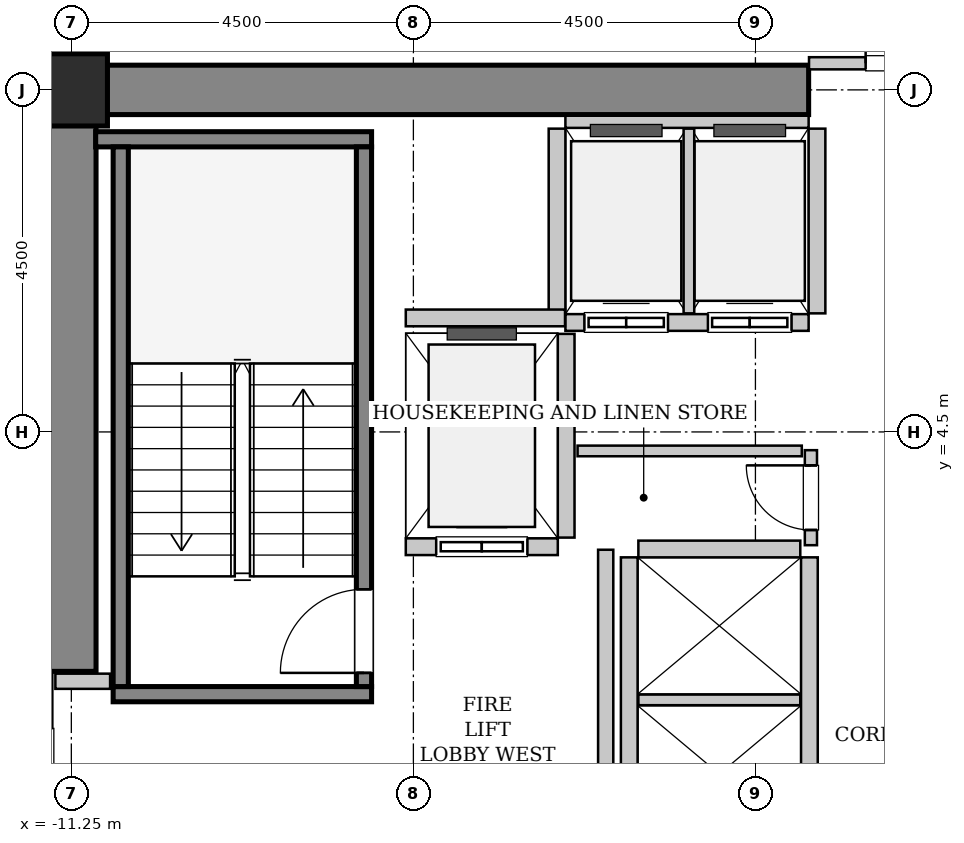
"""IFC4 building model, lengths in metres.
Left out: names, types, materials, properties, quantities, classifications, styles, units other than length and angle.
Written with IfcOpenShell. Run it as: python <this file> out.ifc"""

import sys

from ifc_helpers import new_model, si_unit, direction, frame, frame_2d, origin, origin_2d, place, context, subcontext, project, spatial, rectangle, hollow_rectangle, extrude, source, transform, mapped, element, fill, save


model = new_model("IFC4")
c1 = context("Model", 3, precision=1e-05, world=origin(), true_north=direction((0.0, 1.0)))
c2 = subcontext(c1, "Body", "Model", "MODEL_VIEW")
j1 = project(units=[si_unit("LENGTHUNIT", "METRE"), si_unit("PLANEANGLEUNIT", "RADIAN")], contexts=[c1])
p1 = place(None, origin())
s1 = spatial("IfcSite", under=j1, at=p1, CompositionType="ELEMENT")
p2 = place(p1, origin())
s2 = spatial("IfcBuilding", under=s1, at=p2, CompositionType="ELEMENT")
p3 = place(p2, frame((0.0, 0.0, 82.4)))
s3 = spatial("IfcBuildingStorey", under=s2, at=p3, CompositionType="ELEMENT", Elevation=82.4)
m1 = source(origin(), c2, "Body", "SweptSolid", [
    extrude(rectangle(XDim=10.025, YDim=0.65, at=frame_2d((5.012, 0.0))), origin(), (0.0, 0.0, 1.0), 3.8),
])
p4 = place(p3, frame((-11.575, 9.0, 0.0), z_axis=(0.0, 0.0, 1.0), x_axis=(1.0, 0.0, 0.0)))
e1 = element("IfcWall", 1, at=p4, inside=s3, PredefinedType="SHEAR", context=c2, shape_type="MappedRepresentation", body=[
    mapped(m1, transform((0.0, 0.0, 0.0), x_axis=(1.0, 0.0, 0.0), y_axis=(0.0, 1.0, 0.0), z_axis=(0.0, 0.0, 1.0), scale=1.0)),
])
m2 = source(origin(), c2, "Body", "SweptSolid", [
    extrude(rectangle(XDim=7.325, YDim=0.65, at=frame_2d((3.663, 0.0))), origin(), (0.0, 0.0, 1.0), 3.8),
])
p5 = place(p3, frame((-11.25, 1.35, 0.0), z_axis=(0.0, 0.0, 1.0), x_axis=(0.0, 1.0, 0.0)))
e2 = element("IfcWall", 2, at=p5, inside=s3, PredefinedType="SHEAR", context=c2, shape_type="MappedRepresentation", body=[
    mapped(m2, transform((0.0, 0.0, 0.0), x_axis=(1.0, 0.0, 0.0), y_axis=(0.0, 1.0, 0.0), z_axis=(0.0, 0.0, 1.0), scale=1.0)),
])
m3 = source(origin(), c2, "Body", "SweptSolid", [
    extrude(hollow_rectangle(XDim=0.95, YDim=0.95, WallThickness=0.045, InnerFilletRadius=0.045, OuterFilletRadius=0.09, at=origin_2d()), origin(), (0.0, 0.0, 1.0), 3.8),
])
p6 = place(p3, frame((-11.25, 9.0, 0.0), z_axis=(0.0, 0.0, 1.0), x_axis=(1.0, 0.0, 0.0)))
e3 = element("IfcColumn", 3, at=p6, inside=s3, PredefinedType="COLUMN", context=c2, shape_type="MappedRepresentation", body=[
    mapped(m3, transform((0.0, 0.0, 0.0), x_axis=(1.0, 0.0, 0.0), y_axis=(0.0, 1.0, 0.0), z_axis=(0.0, 0.0, 1.0), scale=1.0)),
])
m4 = source(origin(), c2, "Body", "SweptSolid", [
    extrude(rectangle(XDim=3.4, YDim=0.2, at=frame_2d((1.7, 0.0))), origin(), (0.0, 0.0, 1.0), 3.8),
])
p7 = place(p3, frame((-7.3, 1.05, 0.0), z_axis=(0.0, 0.0, 1.0), x_axis=(-1.0, 0.0, 0.0)))
e4 = element("IfcWall", 4, at=p7, inside=s3, PredefinedType="SOLIDWALL", context=c2, shape_type="MappedRepresentation", body=[
    mapped(m4, transform((0.0, 0.0, 0.0), x_axis=(1.0, 0.0, 0.0), y_axis=(0.0, 1.0, 0.0), z_axis=(0.0, 0.0, 1.0), scale=1.0)),
])
m5 = source(origin(), c2, "Body", "SweptSolid", [
    extrude(rectangle(XDim=3.63, YDim=0.2, at=frame_2d((1.815, 0.0))), origin(), (0.0, 0.0, 1.0), 3.8),
])
p8 = place(p3, frame((-7.3, 8.35, 0.0), z_axis=(0.0, 0.0, 1.0), x_axis=(-1.0, 0.0, 0.0)))
e5 = element("IfcWall", 5, at=p8, inside=s3, PredefinedType="SOLIDWALL", context=c2, shape_type="MappedRepresentation", body=[
    mapped(m5, transform((0.0, 0.0, 0.0), x_axis=(1.0, 0.0, 0.0), y_axis=(0.0, 1.0, 0.0), z_axis=(0.0, 0.0, 1.0), scale=1.0)),
])
m6 = source(origin(), c2, "Body", "SweptSolid", [
    extrude(rectangle(XDim=7.1, YDim=0.2, at=frame_2d((3.55, 0.0))), origin(), (0.0, 0.0, 1.0), 3.8),
])
p9 = place(p3, frame((-7.4, 1.15, 0.0), z_axis=(0.0, 0.0, 1.0), x_axis=(0.0, 1.0, 0.0)))
e6 = element("IfcWall", 6, at=p9, inside=s3, PredefinedType="SOLIDWALL", context=c2, shape_type="MappedRepresentation", body=[
    mapped(m6, transform((0.0, 0.0, 0.0), x_axis=(1.0, 0.0, 0.0), y_axis=(0.0, 1.0, 0.0), z_axis=(0.0, 0.0, 1.0), scale=1.0)),
])
p10 = place(p9, frame((0.18, 0.0, 0.0)))
e7 = element("IfcOpeningElement", 7, at=p10, cuts=e6, PredefinedType="OPENING", context=c2, shape_type="SweptSolid", body=[
    extrude(rectangle(XDim=1.1, YDim=2.15, at=frame_2d((0.55, 1.075))), frame((0.0, 0.11, 0.0), z_axis=(0.0, -1.0, 0.0), x_axis=(1.0, 0.0, 0.0)), (0.0, 0.0, 1.0), 0.22),
])
p11 = place(p3, frame((-10.6, 1.15, 0.0), z_axis=(0.0, 0.0, 1.0), x_axis=(0.0, 1.0, 0.0)))
e8 = element("IfcWall", 8, at=p11, inside=s3, PredefinedType="SOLIDWALL", context=c2, shape_type="MappedRepresentation", body=[
    mapped(m6, transform((0.0, 0.0, 0.0), x_axis=(1.0, 0.0, 0.0), y_axis=(0.0, 1.0, 0.0), z_axis=(0.0, 0.0, 1.0), scale=1.0)),
])
m7 = source(origin(), c2, "Body", "SweptSolid", [
    extrude(rectangle(XDim=2.0, YDim=0.22, at=frame_2d((1.0, 0.0))), origin(), (0.0, 0.0, 1.0), 3.485),
])
p12 = place(p3, frame((-6.85, 2.99, 0.0), z_axis=(0.0, 0.0, 1.0), x_axis=(1.0, 0.0, 0.0)))
e9 = element("IfcWall", 9, at=p12, inside=s3, PredefinedType="SOLIDWALL", context=c2, shape_type="MappedRepresentation", body=[
    mapped(m7, transform((0.0, 0.0, 0.0), x_axis=(1.0, 0.0, 0.0), y_axis=(0.0, 1.0, 0.0), z_axis=(0.0, 0.0, 1.0), scale=1.0)),
])
p13 = place(p12, frame((0.4, 0.0, 0.0)))
e10 = element("IfcOpeningElement", 10, at=p13, cuts=e9, PredefinedType="OPENING", context=c2, shape_type="SweptSolid", body=[
    extrude(rectangle(XDim=1.2, YDim=2.2, at=frame_2d((0.6, 1.1))), frame((0.0, 0.12, 0.0), z_axis=(0.0, -1.0, 0.0), x_axis=(1.0, 0.0, 0.0)), (0.0, 0.0, 1.0), 0.24),
])
m8 = source(origin(), c2, "Body", "SweptSolid", [
    extrude(rectangle(XDim=2.68, YDim=0.22, at=frame_2d((1.34, 0.0))), origin(), (0.0, 0.0, 1.0), 3.485),
])
p14 = place(p3, frame((-4.74, 3.11, 0.0), z_axis=(0.0, 0.0, 1.0), x_axis=(0.0, 1.0, 0.0)))
e11 = element("IfcWall", 11, at=p14, inside=s3, PredefinedType="SOLIDWALL", context=c2, shape_type="MappedRepresentation", body=[
    mapped(m8, transform((0.0, 0.0, 0.0), x_axis=(1.0, 0.0, 0.0), y_axis=(0.0, 1.0, 0.0), z_axis=(0.0, 0.0, 1.0), scale=1.0)),
])
m9 = source(origin(), c2, "Body", "SweptSolid", [
    extrude(rectangle(XDim=3.2, YDim=0.22, at=frame_2d((1.6, 0.0))), origin(), (0.0, 0.0, 1.0), 3.485),
])
p15 = place(p3, frame((-4.75, 5.94, 0.0), z_axis=(0.0, 0.0, 1.0), x_axis=(1.0, 0.0, 0.0)))
e12 = element("IfcWall", 12, at=p15, inside=s3, PredefinedType="SOLIDWALL", context=c2, shape_type="MappedRepresentation", body=[
    mapped(m9, transform((0.0, 0.0, 0.0), x_axis=(1.0, 0.0, 0.0), y_axis=(0.0, 1.0, 0.0), z_axis=(0.0, 0.0, 1.0), scale=1.0)),
])
p16 = place(p15, frame((0.25, 0.0, 0.0)))
e13 = element("IfcOpeningElement", 13, at=p16, cuts=e12, PredefinedType="OPENING", context=c2, shape_type="SweptSolid", body=[
    extrude(rectangle(XDim=1.1, YDim=2.2, at=frame_2d((0.55, 1.1))), frame((0.0, 0.12, 0.0), z_axis=(0.0, -1.0, 0.0), x_axis=(1.0, 0.0, 0.0)), (0.0, 0.0, 1.0), 0.24),
])
p17 = place(p15, frame((1.875, 0.0, 0.0)))
e14 = element("IfcOpeningElement", 14, at=p17, cuts=e12, PredefinedType="OPENING", context=c2, shape_type="SweptSolid", body=[
    extrude(rectangle(XDim=1.1, YDim=2.2, at=frame_2d((0.55, 1.1))), frame((0.0, 0.12, 0.0), z_axis=(0.0, -1.0, 0.0), x_axis=(1.0, 0.0, 0.0)), (0.0, 0.0, 1.0), 0.24),
])
m10 = source(origin(), c2, "Body", "SweptSolid", [
    extrude(rectangle(XDim=3.2, YDim=0.16, at=frame_2d((1.6, 0.0))), origin(), (0.0, 0.0, 1.0), 2.375),
])
p18 = place(p3, frame((-1.55, 8.58, 0.0), z_axis=(0.0, 0.0, 1.0), x_axis=(-1.0, 0.0, 0.0)))
e15 = element("IfcWall", 15, at=p18, inside=s3, PredefinedType="PARTITIONING", context=c2, shape_type="MappedRepresentation", body=[
    mapped(m10, transform((0.0, 0.0, 0.0), x_axis=(1.0, 0.0, 0.0), y_axis=(0.0, 1.0, 0.0), z_axis=(0.0, 0.0, 1.0), scale=1.0)),
])
m11 = source(origin(), c2, "Body", "SweptSolid", [
    extrude(rectangle(XDim=2.43, YDim=0.22, at=frame_2d((1.215, 0.0))), origin(), (0.0, 0.0, 1.0), 3.485),
])
p19 = place(p3, frame((-4.86, 8.49, 0.0), z_axis=(0.0, 0.0, 1.0), x_axis=(0.0, -1.0, 0.0)))
e16 = element("IfcWall", 16, at=p19, inside=s3, PredefinedType="SOLIDWALL", context=c2, shape_type="MappedRepresentation", body=[
    mapped(m11, transform((0.0, 0.0, 0.0), x_axis=(1.0, 0.0, 0.0), y_axis=(0.0, 1.0, 0.0), z_axis=(0.0, 0.0, 1.0), scale=1.0)),
])
m12 = source(origin(), c2, "Body", "SweptSolid", [
    extrude(rectangle(XDim=2.43, YDim=0.14, at=frame_2d((1.215, 0.0))), origin(), (0.0, 0.0, 1.0), 3.485),
])
p20 = place(p3, frame((-3.125, 6.06, 0.0), z_axis=(0.0, 0.0, 1.0), x_axis=(0.0, 1.0, 0.0)))
e17 = element("IfcWall", 17, at=p20, inside=s3, PredefinedType="PARTITIONING", context=c2, shape_type="MappedRepresentation", body=[
    mapped(m12, transform((0.0, 0.0, 0.0), x_axis=(1.0, 0.0, 0.0), y_axis=(0.0, 1.0, 0.0), z_axis=(0.0, 0.0, 1.0), scale=1.0)),
])
p21 = place(p3, frame((-1.44, 6.06, 0.0), z_axis=(0.0, 0.0, 1.0), x_axis=(0.0, 1.0, 0.0)))
e18 = element("IfcWall", 18, at=p21, inside=s3, PredefinedType="SOLIDWALL", context=c2, shape_type="MappedRepresentation", body=[
    mapped(m11, transform((0.0, 0.0, 0.0), x_axis=(1.0, 0.0, 0.0), y_axis=(0.0, 1.0, 0.0), z_axis=(0.0, 0.0, 1.0), scale=1.0)),
])
m13 = source(origin(), c2, "Body", "SweptSolid", [
    extrude(rectangle(XDim=5.7, YDim=0.22, at=frame_2d((2.85, 0.0))), origin(), (0.0, 0.0, 1.0), 3.485),
])
for number, where, z_axis, x_axis in (
    (19, (-1.54, -2.85, 0.0), (0.0, 0.0, 1.0), (0.0, 1.0, 0.0)),
    (20, (-3.91, 2.85, 0.0), (0.0, 0.0, 1.0), (0.0, -1.0, 0.0)),
):
    element("IfcWall", number, at=place(p3, frame(where, z_axis=z_axis, x_axis=x_axis)), inside=s3, PredefinedType="SOLIDWALL", context=c2, shape_type="MappedRepresentation", body=[
        mapped(m13, transform((0.0, 0.0, 0.0), x_axis=(1.0, 0.0, 0.0), y_axis=(0.0, 1.0, 0.0), z_axis=(0.0, 0.0, 1.0), scale=1.0)),
    ])
m14 = source(origin(), c2, "Body", "SweptSolid", [
    extrude(rectangle(XDim=2.13, YDim=0.14, at=frame_2d((1.065, 0.0))), origin(), (0.0, 0.0, 1.0), 3.485),
])
p22 = place(p3, frame((-3.79, 0.975, 0.0), z_axis=(0.0, 0.0, 1.0), x_axis=(1.0, 0.0, 0.0)))
e21 = element("IfcWall", 21, at=p22, inside=s3, PredefinedType="PARTITIONING", context=c2, shape_type="MappedRepresentation", body=[
    mapped(m14, transform((0.0, 0.0, 0.0), x_axis=(1.0, 0.0, 0.0), y_axis=(0.0, 1.0, 0.0), z_axis=(0.0, 0.0, 1.0), scale=1.0)),
])
m15 = source(origin(), c2, "Body", "SweptSolid", [
    extrude(rectangle(XDim=2.13, YDim=0.22, at=frame_2d((1.065, 0.0))), origin(), (0.0, 0.0, 1.0), 3.485),
])
p23 = place(p3, frame((-1.66, 2.96, 0.0), z_axis=(0.0, 0.0, 1.0), x_axis=(-1.0, 0.0, 0.0)))
e22 = element("IfcWall", 22, at=p23, inside=s3, PredefinedType="SOLIDWALL", context=c2, shape_type="MappedRepresentation", body=[
    mapped(m15, transform((0.0, 0.0, 0.0), x_axis=(1.0, 0.0, 0.0), y_axis=(0.0, 1.0, 0.0), z_axis=(0.0, 0.0, 1.0), scale=1.0)),
])
m16 = source(origin(), c2, "Body", "SweptSolid", [
    extrude(rectangle(XDim=2.095, YDim=0.22, at=frame_2d((1.048, 0.0))), origin(), (0.0, 0.0, 1.0), 3.485),
])
p24 = place(p3, frame((-6.85, 6.0, 0.0), z_axis=(0.0, 0.0, 1.0), x_axis=(1.0, 0.0, 0.0)))
e23 = element("IfcWall", 23, at=p24, inside=s3, PredefinedType="SOLIDWALL", context=c2, shape_type="MappedRepresentation", body=[
    mapped(m16, transform((0.0, 0.0, 0.0), x_axis=(1.0, 0.0, 0.0), y_axis=(0.0, 1.0, 0.0), z_axis=(0.0, 0.0, 1.0), scale=1.0)),
])
m17 = source(origin(), c2, "Body", "SweptSolid", [
    extrude(rectangle(XDim=5.9, YDim=0.2, at=frame_2d((2.95, 0.0))), origin(), (0.0, 0.0, 1.0), 3.485),
])
p25 = place(p3, frame((-4.22, -2.95, 0.0), z_axis=(0.0, 0.0, 1.0), x_axis=(0.0, 1.0, 0.0)))
e24 = element("IfcWall", 24, at=p25, inside=s3, PredefinedType="PARTITIONING", context=c2, shape_type="MappedRepresentation", body=[
    mapped(m17, transform((0.0, 0.0, 0.0), x_axis=(1.0, 0.0, 0.0), y_axis=(0.0, 1.0, 0.0), z_axis=(0.0, 0.0, 1.0), scale=1.0)),
])
m18 = source(origin(), c2, "Body", "SweptSolid", [
    extrude(rectangle(XDim=0.72, YDim=0.2, at=frame_2d((0.36, 0.0))), origin(), (0.0, 0.0, 1.0), 3.485),
])
p26 = place(p3, frame((-11.46, 1.22, 0.0), z_axis=(0.0, 0.0, 1.0), x_axis=(1.0, 0.0, 0.0)))
e25 = element("IfcWall", 25, at=p26, inside=s3, PredefinedType="PARTITIONING", context=c2, shape_type="MappedRepresentation", body=[
    mapped(m18, transform((0.0, 0.0, 0.0), x_axis=(1.0, 0.0, 0.0), y_axis=(0.0, 1.0, 0.0), z_axis=(0.0, 0.0, 1.0), scale=1.0)),
])
m19 = source(origin(), c2, "Body", "SweptSolid", [
    extrude(rectangle(XDim=3.09, YDim=0.16, at=frame_2d((1.545, 0.0))), origin(), (0.0, 0.0, 1.0), 2.375),
])
p27 = place(p3, frame((-1.545, 9.35, 0.0), z_axis=(0.0, 0.0, 1.0), x_axis=(1.0, 0.0, 0.0)))
e26 = element("IfcWall", 26, at=p27, inside=s3, PredefinedType="PARTITIONING", context=c2, shape_type="MappedRepresentation", body=[
    mapped(m19, transform((0.0, 0.0, 0.0), x_axis=(1.0, 0.0, 0.0), y_axis=(0.0, 1.0, 0.0), z_axis=(0.0, 0.0, 1.0), scale=1.0)),
])
p28 = place(p27, frame((0.745, 0.0, 0.0)))
e27 = element("IfcOpeningElement", 27, at=p28, cuts=e26, PredefinedType="OPENING", context=c2, shape_type="SweptSolid", body=[
    extrude(rectangle(XDim=1.6, YDim=2.3, at=frame_2d((0.8, 1.15))), frame((0.0, 0.09, 0.0), z_axis=(0.0, -1.0, 0.0), x_axis=(1.0, 0.0, 0.0)), (0.0, 0.0, 1.0), 0.18),
])
m20 = source(origin(), c2, "Body", "SweptSolid", [
    extrude(rectangle(XDim=1.25, YDim=0.16, at=frame_2d((0.625, 0.0))), origin(), (0.0, 0.0, 1.0), 3.485),
])
p29 = place(p3, frame((-1.52, 3.01, 0.0), z_axis=(0.0, 0.0, 1.0), x_axis=(0.0, 1.0, 0.0)))
e28 = element("IfcWall", 28, at=p29, inside=s3, PredefinedType="PARTITIONING", context=c2, shape_type="MappedRepresentation", body=[
    mapped(m20, transform((0.0, 0.0, 0.0), x_axis=(1.0, 0.0, 0.0), y_axis=(0.0, 1.0, 0.0), z_axis=(0.0, 0.0, 1.0), scale=1.0)),
])
p30 = place(p29, frame((0.2, 0.0, 0.0)))
e29 = element("IfcOpeningElement", 29, at=p30, cuts=e28, PredefinedType="OPENING", context=c2, shape_type="SweptSolid", body=[
    extrude(rectangle(XDim=0.85, YDim=2.1, at=frame_2d((0.425, 1.05))), frame((0.0, 0.09, 0.0), z_axis=(0.0, -1.0, 0.0), x_axis=(1.0, 0.0, 0.0)), (0.0, 0.0, 1.0), 0.18),
])
m21 = source(origin(), c2, "Body", "SweptSolid", [
    extrude(rectangle(XDim=2.95, YDim=0.14, at=frame_2d((1.475, 0.0))), origin(), (0.0, 0.0, 1.0), 3.485),
])
p31 = place(p3, frame((-4.59, 4.25, 0.0), z_axis=(0.0, 0.0, 1.0), x_axis=(1.0, 0.0, 0.0)))
e30 = element("IfcWall", 30, at=p31, inside=s3, PredefinedType="PARTITIONING", context=c2, shape_type="MappedRepresentation", body=[
    mapped(m21, transform((0.0, 0.0, 0.0), x_axis=(1.0, 0.0, 0.0), y_axis=(0.0, 1.0, 0.0), z_axis=(0.0, 0.0, 1.0), scale=1.0)),
])
m22 = source(origin(), c2, "Body", "SweptSolid", [
    extrude(rectangle(XDim=1.1, YDim=2.15, at=frame_2d((0.55, 1.075))), frame((0.0, 0.025, 0.0), z_axis=(0.0, -1.0, 0.0), x_axis=(1.0, 0.0, 0.0)), (0.0, 0.0, 1.0), 0.05),
])
p32 = place(p10, origin())
e31 = element("IfcDoor", 31, at=p32, inside=s3, OperationType="SINGLE_SWING_LEFT", PredefinedType="DOOR", context=c2, shape_type="MappedRepresentation", body=[
    mapped(m22, transform((0.0, 0.0, 0.0), x_axis=(1.0, 0.0, 0.0), y_axis=(0.0, 1.0, 0.0), z_axis=(0.0, 0.0, 1.0), scale=1.0)),
])
fill(e7, e31)
m23 = source(origin(), c2, "Body", "SweptSolid", [
    extrude(rectangle(XDim=1.2, YDim=2.2, at=frame_2d((0.6, 1.1))), frame((0.0, 0.025, 0.0), z_axis=(0.0, -1.0, 0.0), x_axis=(1.0, 0.0, 0.0)), (0.0, 0.0, 1.0), 0.05),
])
p33 = place(p13, origin())
e32 = element("IfcDoor", 32, at=p33, inside=s3, OperationType="SLIDING_TO_LEFT", PredefinedType="DOOR", context=c2, shape_type="MappedRepresentation", body=[
    mapped(m23, transform((0.0, 0.0, 0.0), x_axis=(1.0, 0.0, 0.0), y_axis=(0.0, 1.0, 0.0), z_axis=(0.0, 0.0, 1.0), scale=1.0)),
])
fill(e10, e32)
m24 = source(origin(), c2, "Body", "SweptSolid", [
    extrude(rectangle(XDim=1.1, YDim=2.2, at=frame_2d((0.55, 1.1))), frame((0.0, 0.025, 0.0), z_axis=(0.0, -1.0, 0.0), x_axis=(1.0, 0.0, 0.0)), (0.0, 0.0, 1.0), 0.05),
])
p34 = place(p16, origin())
e33 = element("IfcDoor", 33, at=p34, inside=s3, OperationType="DOUBLE_DOOR_SLIDING", PredefinedType="DOOR", context=c2, shape_type="MappedRepresentation", body=[
    mapped(m24, transform((0.0, 0.0, 0.0), x_axis=(1.0, 0.0, 0.0), y_axis=(0.0, 1.0, 0.0), z_axis=(0.0, 0.0, 1.0), scale=1.0)),
])
fill(e13, e33)
p35 = place(p17, origin())
e34 = element("IfcDoor", 34, at=p35, inside=s3, OperationType="DOUBLE_DOOR_SLIDING", PredefinedType="DOOR", context=c2, shape_type="MappedRepresentation", body=[
    mapped(m24, transform((0.0, 0.0, 0.0), x_axis=(1.0, 0.0, 0.0), y_axis=(0.0, 1.0, 0.0), z_axis=(0.0, 0.0, 1.0), scale=1.0)),
])
fill(e14, e34)
m25 = source(origin(), c2, "Body", "SweptSolid", [
    extrude(rectangle(XDim=1.6, YDim=2.3, at=frame_2d((0.8, 1.15))), frame((0.0, 0.025, 0.0), z_axis=(0.0, -1.0, 0.0), x_axis=(1.0, 0.0, 0.0)), (0.0, 0.0, 1.0), 0.05),
])
p36 = place(p28, origin())
e35 = element("IfcDoor", 35, at=p36, inside=s3, OperationType="DOUBLE_DOOR_SINGLE_SWING", PredefinedType="DOOR", context=c2, shape_type="MappedRepresentation", body=[
    mapped(m25, transform((0.0, 0.0, 0.0), x_axis=(1.0, 0.0, 0.0), y_axis=(0.0, 1.0, 0.0), z_axis=(0.0, 0.0, 1.0), scale=1.0)),
])
fill(e27, e35)
m26 = source(origin(), c2, "Body", "SweptSolid", [
    extrude(rectangle(XDim=0.85, YDim=2.1, at=frame_2d((0.425, 1.05))), frame((0.0, 0.025, 0.0), z_axis=(0.0, -1.0, 0.0), x_axis=(1.0, 0.0, 0.0)), (0.0, 0.0, 1.0), 0.05),
])
p37 = place(p30, origin())
e36 = element("IfcDoor", 36, at=p37, inside=s3, OperationType="SINGLE_SWING_RIGHT", PredefinedType="DOOR", context=c2, shape_type="MappedRepresentation", body=[
    mapped(m26, transform((0.0, 0.0, 0.0), x_axis=(1.0, 0.0, 0.0), y_axis=(0.0, 1.0, 0.0), z_axis=(0.0, 0.0, 1.0), scale=1.0)),
])
fill(e29, e36)
save(model, sys.argv[1])
